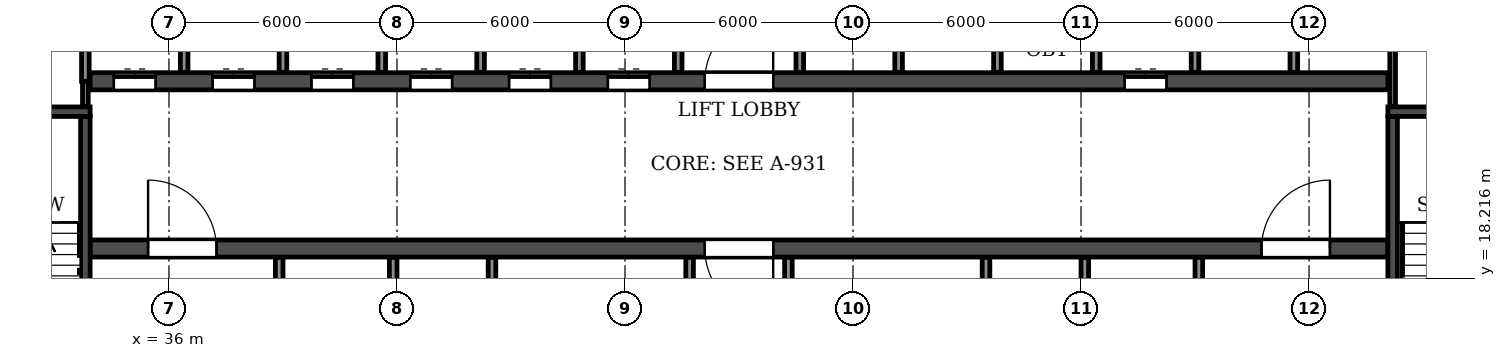
"""IFC4 building model, lengths in metres.
Left out: names, types, materials, properties, quantities, classifications, styles, units other than length and angle.
Written with IfcOpenShell. Run it as: python <this file> out.ifc"""

import sys

from ifc_helpers import new_model, si_unit, direction, frame, frame_2d, origin, place, context, subcontext, project, spatial, rectangle, extrude, element, fill, save


model = new_model("IFC4")
c1 = context("Model", 3, precision=1e-05, world=origin(), true_north=direction((0.0, 1.0)))
c2 = subcontext(c1, "Body", "Model", "MODEL_VIEW")
j1 = project(units=[si_unit("LENGTHUNIT", "METRE"), si_unit("PLANEANGLEUNIT", "RADIAN")], contexts=[c1])
p1 = place(None, origin())
s1 = spatial("IfcSite", under=j1, at=p1, CompositionType="ELEMENT")
p2 = place(p1, origin())
s2 = spatial("IfcBuilding", under=s1, at=p2, CompositionType="ELEMENT")
p3 = place(p2, frame((0.0, 0.0, 165.3)))
s3 = spatial("IfcBuildingStorey", under=s2, at=p3, CompositionType="ELEMENT", Elevation=165.3)
p4 = place(p3, frame((33.925, 19.0, 0.0), z_axis=(0.0, 0.0, 1.0), x_axis=(1.0, 0.0, 0.0)))
e1 = element("IfcWall", 1, at=p4, inside=s3, PredefinedType="SOLIDWALL", context=c2, shape_type="SweptSolid", body=[
    extrude(rectangle(XDim=34.15, YDim=0.45, at=frame_2d((17.075, 0.0))), origin(), (0.0, 0.0, 1.0), 6.38),
])
p5 = place(p4, frame((16.175, 0.0, 0.0)))
e2 = element("IfcOpeningElement", 2, at=p5, cuts=e1, PredefinedType="OPENING", context=c2, shape_type="SweptSolid", body=[
    extrude(rectangle(XDim=1.8, YDim=2.1, at=frame_2d((0.9, 1.05))), frame((0.0, 0.235, 0.0), z_axis=(0.0, -1.0, 0.0), x_axis=(1.0, 0.0, 0.0)), (0.0, 0.0, 1.0), 0.47),
])
p6 = place(p4, frame((1.525, 0.0, 0.0)))
e3 = element("IfcOpeningElement", 3, at=p6, cuts=e1, PredefinedType="OPENING", context=c2, shape_type="SweptSolid", body=[
    extrude(rectangle(XDim=1.8, YDim=2.1, at=frame_2d((0.9, 1.05))), frame((0.0, 0.235, 0.0), z_axis=(0.0, -1.0, 0.0), x_axis=(1.0, 0.0, 0.0)), (0.0, 0.0, 1.0), 0.47),
])
p7 = place(p4, frame((30.825, 0.0, 0.0)))
e4 = element("IfcOpeningElement", 4, at=p7, cuts=e1, PredefinedType="OPENING", context=c2, shape_type="SweptSolid", body=[
    extrude(rectangle(XDim=1.8, YDim=2.1, at=frame_2d((0.9, 1.05))), frame((0.0, 0.235, 0.0), z_axis=(0.0, -1.0, 0.0), x_axis=(1.0, 0.0, 0.0)), (0.0, 0.0, 1.0), 0.47),
])
p8 = place(p3, frame((33.925, 23.4, 0.0), z_axis=(0.0, 0.0, 1.0), x_axis=(1.0, 0.0, 0.0)))
e5 = element("IfcWall", 5, at=p8, inside=s3, PredefinedType="SOLIDWALL", context=c2, shape_type="SweptSolid", body=[
    extrude(rectangle(XDim=34.15, YDim=0.45, at=frame_2d((17.075, 0.0))), origin(), (0.0, 0.0, 1.0), 6.38),
])
p9 = place(p8, frame((16.175, 0.0, 0.0)))
e6 = element("IfcOpeningElement", 6, at=p9, cuts=e5, PredefinedType="OPENING", context=c2, shape_type="SweptSolid", body=[
    extrude(rectangle(XDim=1.8, YDim=2.1, at=frame_2d((0.9, 1.05))), frame((0.0, 0.235, 0.0), z_axis=(0.0, -1.0, 0.0), x_axis=(1.0, 0.0, 0.0)), (0.0, 0.0, 1.0), 0.47),
])
p10 = place(p8, frame((0.625, 0.0, 0.0)))
e7 = element("IfcOpeningElement", 7, at=p10, cuts=e5, PredefinedType="OPENING", context=c2, shape_type="SweptSolid", body=[
    extrude(rectangle(XDim=1.1, YDim=2.1, at=frame_2d((0.55, 1.05))), frame((0.0, 0.235, 0.0), z_axis=(0.0, -1.0, 0.0), x_axis=(1.0, 0.0, 0.0)), (0.0, 0.0, 1.0), 0.47),
])
p11 = place(p8, frame((3.225, 0.0, 0.0)))
e8 = element("IfcOpeningElement", 8, at=p11, cuts=e5, PredefinedType="OPENING", context=c2, shape_type="SweptSolid", body=[
    extrude(rectangle(XDim=1.1, YDim=2.1, at=frame_2d((0.55, 1.05))), frame((0.0, 0.235, 0.0), z_axis=(0.0, -1.0, 0.0), x_axis=(1.0, 0.0, 0.0)), (0.0, 0.0, 1.0), 0.47),
])
p12 = place(p8, frame((5.825, 0.0, 0.0)))
e9 = element("IfcOpeningElement", 9, at=p12, cuts=e5, PredefinedType="OPENING", context=c2, shape_type="SweptSolid", body=[
    extrude(rectangle(XDim=1.1, YDim=2.1, at=frame_2d((0.55, 1.05))), frame((0.0, 0.235, 0.0), z_axis=(0.0, -1.0, 0.0), x_axis=(1.0, 0.0, 0.0)), (0.0, 0.0, 1.0), 0.47),
])
p13 = place(p8, frame((8.425, 0.0, 0.0)))
e10 = element("IfcOpeningElement", 10, at=p13, cuts=e5, PredefinedType="OPENING", context=c2, shape_type="SweptSolid", body=[
    extrude(rectangle(XDim=1.1, YDim=2.1, at=frame_2d((0.55, 1.05))), frame((0.0, 0.235, 0.0), z_axis=(0.0, -1.0, 0.0), x_axis=(1.0, 0.0, 0.0)), (0.0, 0.0, 1.0), 0.47),
])
p14 = place(p8, frame((11.025, 0.0, 0.0)))
e11 = element("IfcOpeningElement", 11, at=p14, cuts=e5, PredefinedType="OPENING", context=c2, shape_type="SweptSolid", body=[
    extrude(rectangle(XDim=1.1, YDim=2.1, at=frame_2d((0.55, 1.05))), frame((0.0, 0.235, 0.0), z_axis=(0.0, -1.0, 0.0), x_axis=(1.0, 0.0, 0.0)), (0.0, 0.0, 1.0), 0.47),
])
p15 = place(p8, frame((13.625, 0.0, 0.0)))
e12 = element("IfcOpeningElement", 12, at=p15, cuts=e5, PredefinedType="OPENING", context=c2, shape_type="SweptSolid", body=[
    extrude(rectangle(XDim=1.1, YDim=2.1, at=frame_2d((0.55, 1.05))), frame((0.0, 0.235, 0.0), z_axis=(0.0, -1.0, 0.0), x_axis=(1.0, 0.0, 0.0)), (0.0, 0.0, 1.0), 0.47),
])
p16 = place(p8, frame((27.225, 0.0, 0.0)))
e13 = element("IfcOpeningElement", 13, at=p16, cuts=e5, PredefinedType="OPENING", context=c2, shape_type="SweptSolid", body=[
    extrude(rectangle(XDim=1.1, YDim=2.1, at=frame_2d((0.55, 1.05))), frame((0.0, 0.235, 0.0), z_axis=(0.0, -1.0, 0.0), x_axis=(1.0, 0.0, 0.0)), (0.0, 0.0, 1.0), 0.47),
])
p17 = place(p3, frame((33.8, 14.825, 0.0), z_axis=(0.0, 0.0, 1.0), x_axis=(0.0, 1.0, 0.0)))
e14 = element("IfcWall", 14, at=p17, inside=s3, PredefinedType="SOLIDWALL", context=c2, shape_type="SweptSolid", body=[
    extrude(rectangle(XDim=7.65, YDim=0.25, at=frame_2d((3.825, 0.0))), origin(), (0.0, 0.0, 1.0), 6.38),
])
p18 = place(p17, frame((0.475, 0.0, 0.0)))
e15 = element("IfcOpeningElement", 15, at=p18, cuts=e14, PredefinedType="OPENING", context=c2, shape_type="SweptSolid", body=[
    extrude(rectangle(XDim=1.0, YDim=2.1, at=frame_2d((0.5, 1.05))), frame((0.0, 0.135, 0.0), z_axis=(0.0, -1.0, 0.0), x_axis=(1.0, 0.0, 0.0)), (0.0, 0.0, 1.0), 0.27),
])
p19 = place(p3, frame((29.875, 22.6, 0.0), z_axis=(0.0, 0.0, 1.0), x_axis=(1.0, 0.0, 0.0)))
e16 = element("IfcWall", 16, at=p19, inside=s3, PredefinedType="SOLIDWALL", context=c2, shape_type="SweptSolid", body=[
    extrude(rectangle(XDim=4.05, YDim=0.25, at=frame_2d((2.025, 0.0))), origin(), (0.0, 0.0, 1.0), 6.38),
])
p20 = place(p3, frame((68.2, 14.825, 0.0), z_axis=(0.0, 0.0, 1.0), x_axis=(0.0, 1.0, 0.0)))
e17 = element("IfcWall", 17, at=p20, inside=s3, PredefinedType="SOLIDWALL", context=c2, shape_type="SweptSolid", body=[
    extrude(rectangle(XDim=7.65, YDim=0.25, at=frame_2d((3.825, 0.0))), origin(), (0.0, 0.0, 1.0), 6.38),
])
p21 = place(p20, frame((0.475, 0.0, 0.0)))
e18 = element("IfcOpeningElement", 18, at=p21, cuts=e17, PredefinedType="OPENING", context=c2, shape_type="SweptSolid", body=[
    extrude(rectangle(XDim=1.0, YDim=2.1, at=frame_2d((0.5, 1.05))), frame((0.0, 0.135, 0.0), z_axis=(0.0, -1.0, 0.0), x_axis=(1.0, 0.0, 0.0)), (0.0, 0.0, 1.0), 0.27),
])
p22 = place(p3, frame((68.075, 22.6, 0.0), z_axis=(0.0, 0.0, 1.0), x_axis=(1.0, 0.0, 0.0)))
e19 = element("IfcWall", 19, at=p22, inside=s3, PredefinedType="SOLIDWALL", context=c2, shape_type="SweptSolid", body=[
    extrude(rectangle(XDim=4.05, YDim=0.25, at=frame_2d((2.025, 0.0))), origin(), (0.0, 0.0, 1.0), 6.38),
])
for number, where, z_axis, x_axis in (
    (20, (44.5, 14.91, 0.0), (0.0, 0.0, 1.0), (0.0, 1.0, 0.0)),
    (21, (49.7, 14.91, 0.0), (0.0, 0.0, 1.0), (0.0, 1.0, 0.0)),
    (22, (52.3, 14.91, 0.0), (0.0, 0.0, 1.0), (0.0, 1.0, 0.0)),
    (23, (52.6, 23.635, 0.0), (0.0, 0.0, 1.0), (0.0, 1.0, 0.0)),
    (24, (55.2, 23.635, 0.0), (0.0, 0.0, 1.0), (0.0, 1.0, 0.0)),
    (25, (57.5, 14.91, 0.0), (0.0, 0.0, 1.0), (0.0, 1.0, 0.0)),
    (26, (65.6, 23.635, 0.0), (0.0, 0.0, 1.0), (0.0, 1.0, 0.0)),
):
    element("IfcWall", number, at=place(p3, frame(where, z_axis=z_axis, x_axis=x_axis)), inside=s3, PredefinedType="PARTITIONING", context=c2, shape_type="SweptSolid", body=[
        extrude(rectangle(XDim=3.855, YDim=0.2, at=frame_2d((1.927, 0.0))), origin(), (0.0, 0.0, 1.0), 6.38),
    ])
p23 = place(p3, frame((33.8, 22.735, 0.0), z_axis=(0.0, 0.0, 1.0), x_axis=(0.0, 1.0, 0.0)))
e27 = element("IfcWall", 27, at=p23, inside=s3, PredefinedType="PARTITIONING", context=c2, shape_type="SweptSolid", body=[
    extrude(rectangle(XDim=0.665, YDim=0.15, at=frame_2d((0.333, 0.0))), origin(), (0.0, 0.0, 1.0), 6.38),
])
p24 = place(p3, frame((68.2, 22.735, 0.0), z_axis=(0.0, 0.0, 1.0), x_axis=(0.0, 1.0, 0.0)))
e28 = element("IfcWall", 28, at=p24, inside=s3, PredefinedType="PARTITIONING", context=c2, shape_type="SweptSolid", body=[
    extrude(rectangle(XDim=4.755, YDim=0.15, at=frame_2d((2.377, 0.0))), origin(), (0.0, 0.0, 1.0), 6.38),
])
p25 = place(p3, frame((33.8, 23.4, 0.0), z_axis=(0.0, 0.0, 1.0), x_axis=(0.0, 1.0, 0.0)))
e29 = element("IfcWall", 29, at=p25, inside=s3, PredefinedType="PARTITIONING", context=c2, shape_type="SweptSolid", body=[
    extrude(rectangle(XDim=2.7, YDim=0.2, at=frame_2d((1.35, 0.0))), origin(), (0.0, 0.0, 1.0), 6.38),
])
p26 = place(p3, frame((36.4, 23.635, 0.0), z_axis=(0.0, 0.0, 1.0), x_axis=(0.0, 1.0, 0.0)))
e30 = element("IfcWall", 30, at=p26, inside=s3, PredefinedType="PARTITIONING", context=c2, shape_type="SweptSolid", body=[
    extrude(rectangle(XDim=2.465, YDim=0.2, at=frame_2d((1.232, 0.0))), origin(), (0.0, 0.0, 1.0), 6.38),
])
p27 = place(p3, frame((38.9, 14.91, 0.0), z_axis=(0.0, 0.0, 1.0), x_axis=(0.0, 1.0, 0.0)))
e31 = element("IfcWall", 31, at=p27, inside=s3, PredefinedType="PARTITIONING", context=c2, shape_type="SweptSolid", body=[
    extrude(rectangle(XDim=3.855, YDim=0.2, at=frame_2d((1.927, 0.0))), origin(), (0.0, 0.0, 1.0), 6.38),
])
p28 = place(p27, frame((1.34, 0.0, 0.0)))
e32 = element("IfcOpeningElement", 32, at=p28, cuts=e31, PredefinedType="OPENING", context=c2, shape_type="SweptSolid", body=[
    extrude(rectangle(XDim=1.1, YDim=2.1, at=frame_2d((0.55, 1.05))), frame((0.0, 0.11, 0.0), z_axis=(0.0, -1.0, 0.0), x_axis=(1.0, 0.0, 0.0)), (0.0, 0.0, 1.0), 0.22),
])
for number, where, z_axis, x_axis in (
    (33, (39.0, 23.635, 0.0), (0.0, 0.0, 1.0), (0.0, 1.0, 0.0)),
    (34, (41.6, 23.635, 0.0), (0.0, 0.0, 1.0), (0.0, 1.0, 0.0)),
):
    element("IfcWall", number, at=place(p3, frame(where, z_axis=z_axis, x_axis=x_axis)), inside=s3, PredefinedType="PARTITIONING", context=c2, shape_type="SweptSolid", body=[
        extrude(rectangle(XDim=2.465, YDim=0.2, at=frame_2d((1.232, 0.0))), origin(), (0.0, 0.0, 1.0), 6.38),
    ])
for number, where, z_axis, x_axis in (
    (35, (41.9, 14.91, 0.0), (0.0, 0.0, 1.0), (0.0, 1.0, 0.0)),
    (36, (44.2, 23.635, 0.0), (0.0, 0.0, 1.0), (0.0, 1.0, 0.0)),
    (37, (46.8, 23.635, 0.0), (0.0, 0.0, 1.0), (0.0, 1.0, 0.0)),
):
    element("IfcWall", number, at=place(p3, frame(where, z_axis=z_axis, x_axis=x_axis)), inside=s3, PredefinedType="PARTITIONING", context=c2, shape_type="SweptSolid", body=[
        extrude(rectangle(XDim=3.855, YDim=0.2, at=frame_2d((1.927, 0.0))), origin(), (0.0, 0.0, 1.0), 6.38),
    ])
for number, where, z_axis, x_axis in (
    (38, (49.4, 23.635, 0.0), (0.0, 0.0, 1.0), (0.0, 1.0, 0.0)),
    (39, (57.8, 23.635, 0.0), (0.0, 0.0, 1.0), (0.0, 1.0, 0.0)),
):
    element("IfcWall", number, at=place(p3, frame(where, z_axis=z_axis, x_axis=x_axis)), inside=s3, PredefinedType="PARTITIONING", context=c2, shape_type="SweptSolid", body=[
        extrude(rectangle(XDim=2.465, YDim=0.2, at=frame_2d((1.232, 0.0))), origin(), (0.0, 0.0, 1.0), 6.38),
    ])
p29 = place(p3, frame((60.1, 14.91, 0.0), z_axis=(0.0, 0.0, 1.0), x_axis=(0.0, 1.0, 0.0)))
e40 = element("IfcWall", 40, at=p29, inside=s3, PredefinedType="PARTITIONING", context=c2, shape_type="SweptSolid", body=[
    extrude(rectangle(XDim=3.855, YDim=0.2, at=frame_2d((1.927, 0.0))), origin(), (0.0, 0.0, 1.0), 6.38),
])
for number, where, z_axis, x_axis in (
    (41, (60.4, 23.635, 0.0), (0.0, 0.0, 1.0), (0.0, 1.0, 0.0)),
    (42, (63.0, 23.635, 0.0), (0.0, 0.0, 1.0), (0.0, 1.0, 0.0)),
):
    element("IfcWall", number, at=place(p3, frame(where, z_axis=z_axis, x_axis=x_axis)), inside=s3, PredefinedType="PARTITIONING", context=c2, shape_type="SweptSolid", body=[
        extrude(rectangle(XDim=2.465, YDim=0.2, at=frame_2d((1.232, 0.0))), origin(), (0.0, 0.0, 1.0), 6.38),
    ])
p30 = place(p3, frame((63.1, 14.91, 0.0), z_axis=(0.0, 0.0, 1.0), x_axis=(0.0, 1.0, 0.0)))
e43 = element("IfcWall", 43, at=p30, inside=s3, PredefinedType="PARTITIONING", context=c2, shape_type="SweptSolid", body=[
    extrude(rectangle(XDim=3.855, YDim=0.2, at=frame_2d((1.927, 0.0))), origin(), (0.0, 0.0, 1.0), 6.38),
])
p31 = place(p30, frame((1.34, 0.0, 0.0)))
e44 = element("IfcOpeningElement", 44, at=p31, cuts=e43, PredefinedType="OPENING", context=c2, shape_type="SweptSolid", body=[
    extrude(rectangle(XDim=1.1, YDim=2.1, at=frame_2d((0.55, 1.05))), frame((0.0, 0.11, 0.0), z_axis=(0.0, -1.0, 0.0), x_axis=(1.0, 0.0, 0.0)), (0.0, 0.0, 1.0), 0.22),
])
p32 = place(p9, origin())
e45 = element("IfcDoor", 45, at=p32, inside=s3, OperationType="DOUBLE_DOOR_SINGLE_SWING", PredefinedType="DOOR", context=c2, shape_type="SweptSolid", body=[
    extrude(rectangle(XDim=1.8, YDim=2.1, at=frame_2d((0.9, 1.05))), frame((0.0, 0.025, 0.0), z_axis=(0.0, -1.0, 0.0), x_axis=(1.0, 0.0, 0.0)), (0.0, 0.0, 1.0), 0.05),
])
fill(e6, e45)
p33 = place(p5, frame((1.8, 0.0, 0.0), z_axis=(0.0, 0.0, 1.0), x_axis=(-1.0, 0.0, 0.0)))
e46 = element("IfcDoor", 46, at=p33, inside=s3, OperationType="DOUBLE_DOOR_SINGLE_SWING", PredefinedType="DOOR", context=c2, shape_type="SweptSolid", body=[
    extrude(rectangle(XDim=1.8, YDim=2.1, at=frame_2d((0.9, 1.05))), frame((0.0, 0.025, 0.0), z_axis=(0.0, -1.0, 0.0), x_axis=(1.0, 0.0, 0.0)), (0.0, 0.0, 1.0), 0.05),
])
fill(e2, e46)
p34 = place(p10, origin())
e47 = element("IfcDoor", 47, at=p34, inside=s3, OperationType="DOUBLE_DOOR_SLIDING", PredefinedType="DOOR", context=c2, shape_type="SweptSolid", body=[
    extrude(rectangle(XDim=1.1, YDim=2.1, at=frame_2d((0.55, 1.05))), frame((0.0, 0.025, 0.0), z_axis=(0.0, -1.0, 0.0), x_axis=(1.0, 0.0, 0.0)), (0.0, 0.0, 1.0), 0.05),
])
fill(e7, e47)
p35 = place(p6, origin())
e48 = element("IfcDoor", 48, at=p35, inside=s3, OperationType="DOUBLE_DOOR_SINGLE_SWING", PredefinedType="DOOR", context=c2, shape_type="SweptSolid", body=[
    extrude(rectangle(XDim=1.8, YDim=2.1, at=frame_2d((0.9, 1.05))), frame((0.0, 0.025, 0.0), z_axis=(0.0, -1.0, 0.0), x_axis=(1.0, 0.0, 0.0)), (0.0, 0.0, 1.0), 0.05),
])
fill(e3, e48)
p36 = place(p11, origin())
e49 = element("IfcDoor", 49, at=p36, inside=s3, OperationType="DOUBLE_DOOR_SLIDING", PredefinedType="DOOR", context=c2, shape_type="SweptSolid", body=[
    extrude(rectangle(XDim=1.1, YDim=2.1, at=frame_2d((0.55, 1.05))), frame((0.0, 0.025, 0.0), z_axis=(0.0, -1.0, 0.0), x_axis=(1.0, 0.0, 0.0)), (0.0, 0.0, 1.0), 0.05),
])
fill(e8, e49)
p37 = place(p12, origin())
e50 = element("IfcDoor", 50, at=p37, inside=s3, OperationType="DOUBLE_DOOR_SLIDING", PredefinedType="DOOR", context=c2, shape_type="SweptSolid", body=[
    extrude(rectangle(XDim=1.1, YDim=2.1, at=frame_2d((0.55, 1.05))), frame((0.0, 0.025, 0.0), z_axis=(0.0, -1.0, 0.0), x_axis=(1.0, 0.0, 0.0)), (0.0, 0.0, 1.0), 0.05),
])
fill(e9, e50)
p38 = place(p13, origin())
e51 = element("IfcDoor", 51, at=p38, inside=s3, OperationType="DOUBLE_DOOR_SLIDING", PredefinedType="DOOR", context=c2, shape_type="SweptSolid", body=[
    extrude(rectangle(XDim=1.1, YDim=2.1, at=frame_2d((0.55, 1.05))), frame((0.0, 0.025, 0.0), z_axis=(0.0, -1.0, 0.0), x_axis=(1.0, 0.0, 0.0)), (0.0, 0.0, 1.0), 0.05),
])
fill(e10, e51)
p39 = place(p14, origin())
e52 = element("IfcDoor", 52, at=p39, inside=s3, OperationType="DOUBLE_DOOR_SLIDING", PredefinedType="DOOR", context=c2, shape_type="SweptSolid", body=[
    extrude(rectangle(XDim=1.1, YDim=2.1, at=frame_2d((0.55, 1.05))), frame((0.0, 0.025, 0.0), z_axis=(0.0, -1.0, 0.0), x_axis=(1.0, 0.0, 0.0)), (0.0, 0.0, 1.0), 0.05),
])
fill(e11, e52)
p40 = place(p15, origin())
e53 = element("IfcDoor", 53, at=p40, inside=s3, OperationType="DOUBLE_DOOR_SLIDING", PredefinedType="DOOR", context=c2, shape_type="SweptSolid", body=[
    extrude(rectangle(XDim=1.1, YDim=2.1, at=frame_2d((0.55, 1.05))), frame((0.0, 0.025, 0.0), z_axis=(0.0, -1.0, 0.0), x_axis=(1.0, 0.0, 0.0)), (0.0, 0.0, 1.0), 0.05),
])
fill(e12, e53)
p41 = place(p16, origin())
e54 = element("IfcDoor", 54, at=p41, inside=s3, OperationType="DOUBLE_DOOR_SLIDING", PredefinedType="DOOR", context=c2, shape_type="SweptSolid", body=[
    extrude(rectangle(XDim=1.1, YDim=2.1, at=frame_2d((0.55, 1.05))), frame((0.0, 0.025, 0.0), z_axis=(0.0, -1.0, 0.0), x_axis=(1.0, 0.0, 0.0)), (0.0, 0.0, 1.0), 0.05),
])
fill(e13, e54)
p42 = place(p7, origin())
e55 = element("IfcDoor", 55, at=p42, inside=s3, OperationType="DOUBLE_DOOR_SINGLE_SWING", PredefinedType="DOOR", context=c2, shape_type="SweptSolid", body=[
    extrude(rectangle(XDim=1.8, YDim=2.1, at=frame_2d((0.9, 1.05))), frame((0.0, 0.025, 0.0), z_axis=(0.0, -1.0, 0.0), x_axis=(1.0, 0.0, 0.0)), (0.0, 0.0, 1.0), 0.05),
])
fill(e4, e55)
save(model, sys.argv[1])
